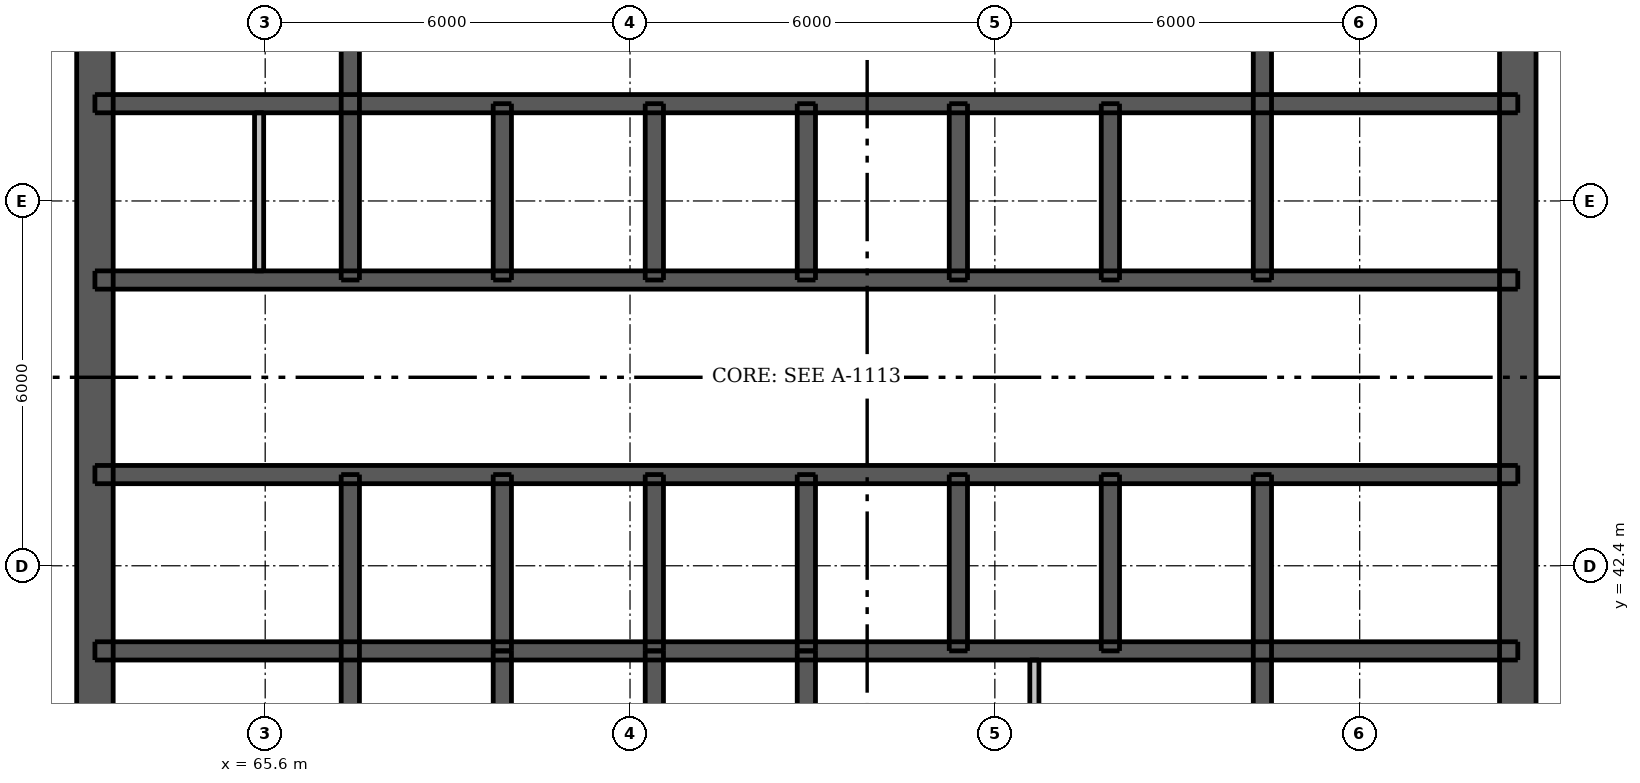
"""IFC4 building model, lengths in metres.
Left out: names, types, materials, properties, quantities, classifications, styles, units other than length and angle.
Written with IfcOpenShell. Run it as: python <this file> out.ifc"""

import sys

from ifc_helpers import new_model, si_unit, direction, frame, frame_2d, origin, place, context, subcontext, project, spatial, rectangle, extrude, element, fill, save


model = new_model("IFC4")
c1 = context("Model", 3, precision=1e-05, world=origin(), true_north=direction((0.0, 1.0)))
c2 = subcontext(c1, "Body", "Model", "MODEL_VIEW")
j1 = project(units=[si_unit("LENGTHUNIT", "METRE"), si_unit("PLANEANGLEUNIT", "RADIAN")], contexts=[c1])
p1 = place(None, origin())
s1 = spatial("IfcSite", under=j1, at=p1, CompositionType="ELEMENT")
p2 = place(p1, origin())
s2 = spatial("IfcBuilding", under=s1, at=p2, CompositionType="ELEMENT")
p3 = place(p2, frame((0.0, 0.0, 223.3)))
s3 = spatial("IfcBuildingStorey", under=s2, at=p3, CompositionType="ELEMENT", Elevation=223.3)
p4 = place(p3, frame((62.8, 33.5, 0.0), z_axis=(0.0, 0.0, 1.0), x_axis=(0.0, 1.0, 0.0)))
e1 = element("IfcWall", 1, at=p4, inside=s3, PredefinedType="SHEAR", context=c2, shape_type="SweptSolid", body=[
    extrude(rectangle(XDim=24.0, YDim=0.6, at=frame_2d((12.0, 0.0))), origin(), (0.0, 0.0, 1.0), 3.05),
])
p5 = place(p4, frame((11.2, 0.0, 0.0)))
e2 = element("IfcOpeningElement", 2, at=p5, cuts=e1, PredefinedType="OPENING", context=c2, shape_type="SweptSolid", body=[
    extrude(rectangle(XDim=1.6, YDim=2.1, at=frame_2d((0.8, 1.05))), frame((0.0, 0.31, 0.0), z_axis=(0.0, -1.0, 0.0), x_axis=(1.0, 0.0, 0.0)), (0.0, 0.0, 1.0), 0.62),
])
p6 = place(p3, frame((86.2, 33.5, 0.0), z_axis=(0.0, 0.0, 1.0), x_axis=(0.0, 1.0, 0.0)))
e3 = element("IfcWall", 3, at=p6, inside=s3, PredefinedType="SHEAR", context=c2, shape_type="SweptSolid", body=[
    extrude(rectangle(XDim=24.0, YDim=0.6, at=frame_2d((12.0, 0.0))), origin(), (0.0, 0.0, 1.0), 3.05),
])
p7 = place(p6, frame((11.2, 0.0, 0.0)))
e4 = element("IfcOpeningElement", 4, at=p7, cuts=e3, PredefinedType="OPENING", context=c2, shape_type="SweptSolid", body=[
    extrude(rectangle(XDim=1.6, YDim=2.1, at=frame_2d((0.8, 1.05))), frame((0.0, 0.31, 0.0), z_axis=(0.0, -1.0, 0.0), x_axis=(1.0, 0.0, 0.0)), (0.0, 0.0, 1.0), 0.62),
])
p8 = place(p3, frame((62.8, 41.0, 0.0), z_axis=(0.0, 0.0, 1.0), x_axis=(1.0, 0.0, 0.0)))
e5 = element("IfcWall", 5, at=p8, inside=s3, PredefinedType="SHEAR", context=c2, shape_type="SweptSolid", body=[
    extrude(rectangle(XDim=23.4, YDim=0.3, at=frame_2d((11.7, 0.0))), origin(), (0.0, 0.0, 1.0), 3.05),
])
p9 = place(p3, frame((62.8, 43.9, 0.0), z_axis=(0.0, 0.0, 1.0), x_axis=(1.0, 0.0, 0.0)))
e6 = element("IfcWall", 6, at=p9, inside=s3, PredefinedType="SHEAR", context=c2, shape_type="SweptSolid", body=[
    extrude(rectangle(XDim=23.4, YDim=0.3, at=frame_2d((11.7, 0.0))), origin(), (0.0, 0.0, 1.0), 3.05),
])
p10 = place(p9, frame((1.725, 0.0, 0.0)))
e7 = element("IfcOpeningElement", 7, at=p10, cuts=e6, PredefinedType="OPENING", context=c2, shape_type="SweptSolid", body=[
    extrude(rectangle(XDim=0.9, YDim=2.1, at=frame_2d((0.45, 1.05))), frame((0.0, 0.16, 0.0), z_axis=(0.0, -1.0, 0.0), x_axis=(1.0, 0.0, 0.0)), (0.0, 0.0, 1.0), 0.32),
])
p11 = place(p9, frame((20.775, 0.0, 0.0)))
e8 = element("IfcOpeningElement", 8, at=p11, cuts=e6, PredefinedType="OPENING", context=c2, shape_type="SweptSolid", body=[
    extrude(rectangle(XDim=0.9, YDim=2.1, at=frame_2d((0.45, 1.05))), frame((0.0, 0.16, 0.0), z_axis=(0.0, -1.0, 0.0), x_axis=(1.0, 0.0, 0.0)), (0.0, 0.0, 1.0), 0.32),
])
p12 = place(p9, frame((5.0, 0.0, 0.0)))
e9 = element("IfcOpeningElement", 9, at=p12, cuts=e6, PredefinedType="OPENING", context=c2, shape_type="SweptSolid", body=[
    extrude(rectangle(XDim=0.9, YDim=2.1, at=frame_2d((0.45, 1.05))), frame((0.0, 0.16, 0.0), z_axis=(0.0, -1.0, 0.0), x_axis=(1.0, 0.0, 0.0)), (0.0, 0.0, 1.0), 0.32),
])
p13 = place(p9, frame((7.5, 0.0, 0.0)))
e10 = element("IfcOpeningElement", 10, at=p13, cuts=e6, PredefinedType="OPENING", context=c2, shape_type="SweptSolid", body=[
    extrude(rectangle(XDim=0.9, YDim=2.1, at=frame_2d((0.45, 1.05))), frame((0.0, 0.16, 0.0), z_axis=(0.0, -1.0, 0.0), x_axis=(1.0, 0.0, 0.0)), (0.0, 0.0, 1.0), 0.32),
])
p14 = place(p9, frame((12.5, 0.0, 0.0)))
e11 = element("IfcOpeningElement", 11, at=p14, cuts=e6, PredefinedType="OPENING", context=c2, shape_type="SweptSolid", body=[
    extrude(rectangle(XDim=0.9, YDim=2.1, at=frame_2d((0.45, 1.05))), frame((0.0, 0.16, 0.0), z_axis=(0.0, -1.0, 0.0), x_axis=(1.0, 0.0, 0.0)), (0.0, 0.0, 1.0), 0.32),
])
p15 = place(p9, frame((15.0, 0.0, 0.0)))
e12 = element("IfcOpeningElement", 12, at=p15, cuts=e6, PredefinedType="OPENING", context=c2, shape_type="SweptSolid", body=[
    extrude(rectangle(XDim=0.9, YDim=2.1, at=frame_2d((0.45, 1.05))), frame((0.0, 0.16, 0.0), z_axis=(0.0, -1.0, 0.0), x_axis=(1.0, 0.0, 0.0)), (0.0, 0.0, 1.0), 0.32),
])
p16 = place(p3, frame((62.8, 47.1, 0.0), z_axis=(0.0, 0.0, 1.0), x_axis=(1.0, 0.0, 0.0)))
e13 = element("IfcWall", 13, at=p16, inside=s3, PredefinedType="SHEAR", context=c2, shape_type="SweptSolid", body=[
    extrude(rectangle(XDim=23.4, YDim=0.3, at=frame_2d((11.7, 0.0))), origin(), (0.0, 0.0, 1.0), 3.05),
])
p17 = place(p16, frame((1.05, 0.0, 0.0)))
e14 = element("IfcOpeningElement", 14, at=p17, cuts=e13, PredefinedType="OPENING", context=c2, shape_type="SweptSolid", body=[
    extrude(rectangle(XDim=0.9, YDim=2.1, at=frame_2d((0.45, 1.05))), frame((0.0, 0.16, 0.0), z_axis=(0.0, -1.0, 0.0), x_axis=(1.0, 0.0, 0.0)), (0.0, 0.0, 1.0), 0.32),
])
p18 = place(p16, frame((2.975, 0.0, 0.0)))
e15 = element("IfcOpeningElement", 15, at=p18, cuts=e13, PredefinedType="OPENING", context=c2, shape_type="SweptSolid", body=[
    extrude(rectangle(XDim=0.8, YDim=2.1, at=frame_2d((0.4, 1.05))), frame((0.0, 0.16, 0.0), z_axis=(0.0, -1.0, 0.0), x_axis=(1.0, 0.0, 0.0)), (0.0, 0.0, 1.0), 0.32),
])
p19 = place(p16, frame((20.775, 0.0, 0.0)))
e16 = element("IfcOpeningElement", 16, at=p19, cuts=e13, PredefinedType="OPENING", context=c2, shape_type="SweptSolid", body=[
    extrude(rectangle(XDim=0.9, YDim=2.1, at=frame_2d((0.45, 1.05))), frame((0.0, 0.16, 0.0), z_axis=(0.0, -1.0, 0.0), x_axis=(1.0, 0.0, 0.0)), (0.0, 0.0, 1.0), 0.32),
])
p20 = place(p16, frame((4.9, 0.0, 0.0)))
e17 = element("IfcOpeningElement", 17, at=p20, cuts=e13, PredefinedType="OPENING", context=c2, shape_type="SweptSolid", body=[
    extrude(rectangle(XDim=1.1, YDim=2.1, at=frame_2d((0.55, 1.05))), frame((0.0, 0.16, 0.0), z_axis=(0.0, -1.0, 0.0), x_axis=(1.0, 0.0, 0.0)), (0.0, 0.0, 1.0), 0.32),
])
p21 = place(p16, frame((7.4, 0.0, 0.0)))
e18 = element("IfcOpeningElement", 18, at=p21, cuts=e13, PredefinedType="OPENING", context=c2, shape_type="SweptSolid", body=[
    extrude(rectangle(XDim=1.1, YDim=2.1, at=frame_2d((0.55, 1.05))), frame((0.0, 0.16, 0.0), z_axis=(0.0, -1.0, 0.0), x_axis=(1.0, 0.0, 0.0)), (0.0, 0.0, 1.0), 0.32),
])
p22 = place(p16, frame((9.9, 0.0, 0.0)))
e19 = element("IfcOpeningElement", 19, at=p22, cuts=e13, PredefinedType="OPENING", context=c2, shape_type="SweptSolid", body=[
    extrude(rectangle(XDim=1.1, YDim=2.1, at=frame_2d((0.55, 1.05))), frame((0.0, 0.16, 0.0), z_axis=(0.0, -1.0, 0.0), x_axis=(1.0, 0.0, 0.0)), (0.0, 0.0, 1.0), 0.32),
])
p23 = place(p16, frame((12.4, 0.0, 0.0)))
e20 = element("IfcOpeningElement", 20, at=p23, cuts=e13, PredefinedType="OPENING", context=c2, shape_type="SweptSolid", body=[
    extrude(rectangle(XDim=1.1, YDim=2.1, at=frame_2d((0.55, 1.05))), frame((0.0, 0.16, 0.0), z_axis=(0.0, -1.0, 0.0), x_axis=(1.0, 0.0, 0.0)), (0.0, 0.0, 1.0), 0.32),
])
p24 = place(p16, frame((14.9, 0.0, 0.0)))
e21 = element("IfcOpeningElement", 21, at=p24, cuts=e13, PredefinedType="OPENING", context=c2, shape_type="SweptSolid", body=[
    extrude(rectangle(XDim=1.1, YDim=2.1, at=frame_2d((0.55, 1.05))), frame((0.0, 0.16, 0.0), z_axis=(0.0, -1.0, 0.0), x_axis=(1.0, 0.0, 0.0)), (0.0, 0.0, 1.0), 0.32),
])
p25 = place(p16, frame((17.4, 0.0, 0.0)))
e22 = element("IfcOpeningElement", 22, at=p25, cuts=e13, PredefinedType="OPENING", context=c2, shape_type="SweptSolid", body=[
    extrude(rectangle(XDim=1.1, YDim=2.1, at=frame_2d((0.55, 1.05))), frame((0.0, 0.16, 0.0), z_axis=(0.0, -1.0, 0.0), x_axis=(1.0, 0.0, 0.0)), (0.0, 0.0, 1.0), 0.32),
])
p26 = place(p3, frame((62.8, 50.0, 0.0), z_axis=(0.0, 0.0, 1.0), x_axis=(1.0, 0.0, 0.0)))
e23 = element("IfcWall", 23, at=p26, inside=s3, PredefinedType="SHEAR", context=c2, shape_type="SweptSolid", body=[
    extrude(rectangle(XDim=23.4, YDim=0.3, at=frame_2d((11.7, 0.0))), origin(), (0.0, 0.0, 1.0), 3.05),
])
p27 = place(p3, frame((67.0, 33.8, 0.0), z_axis=(0.0, 0.0, 1.0), x_axis=(0.0, 1.0, 0.0)))
e24 = element("IfcWall", 24, at=p27, inside=s3, PredefinedType="SHEAR", context=c2, shape_type="SweptSolid", body=[
    extrude(rectangle(XDim=10.1, YDim=0.3, at=frame_2d((5.05, 0.0))), origin(), (0.0, 0.0, 1.0), 3.05),
])
p28 = place(p27, frame((0.5, 0.0, 0.0)))
e25 = element("IfcOpeningElement", 25, at=p28, cuts=e24, PredefinedType="OPENING", context=c2, shape_type="SweptSolid", body=[
    extrude(rectangle(XDim=1.1, YDim=2.1, at=frame_2d((0.55, 1.05))), frame((0.0, 0.16, 0.0), z_axis=(0.0, -1.0, 0.0), x_axis=(1.0, 0.0, 0.0)), (0.0, 0.0, 1.0), 0.32),
])
for number, where, z_axis, x_axis in (
    (26, (67.0, 47.1, 0.0), (0.0, 0.0, 1.0), (0.0, 1.0, 0.0)),
    (27, (82.0, 33.8, 0.0), (0.0, 0.0, 1.0), (0.0, 1.0, 0.0)),
    (28, (82.0, 47.1, 0.0), (0.0, 0.0, 1.0), (0.0, 1.0, 0.0)),
):
    element("IfcWall", number, at=place(p3, frame(where, z_axis=z_axis, x_axis=x_axis)), inside=s3, PredefinedType="SHEAR", context=c2, shape_type="SweptSolid", body=[
        extrude(rectangle(XDim=10.1, YDim=0.3, at=frame_2d((5.05, 0.0))), origin(), (0.0, 0.0, 1.0), 3.05),
    ])
for number, where, z_axis, x_axis in (
    (29, (69.5, 41.0, 0.0), (0.0, 0.0, 1.0), (0.0, 1.0, 0.0)),
    (30, (69.5, 47.1, 0.0), (0.0, 0.0, 1.0), (0.0, 1.0, 0.0)),
    (31, (72.0, 41.0, 0.0), (0.0, 0.0, 1.0), (0.0, 1.0, 0.0)),
    (32, (72.0, 47.1, 0.0), (0.0, 0.0, 1.0), (0.0, 1.0, 0.0)),
    (33, (74.5, 41.0, 0.0), (0.0, 0.0, 1.0), (0.0, 1.0, 0.0)),
    (34, (74.5, 47.1, 0.0), (0.0, 0.0, 1.0), (0.0, 1.0, 0.0)),
    (35, (77.0, 41.0, 0.0), (0.0, 0.0, 1.0), (0.0, 1.0, 0.0)),
    (36, (77.0, 47.1, 0.0), (0.0, 0.0, 1.0), (0.0, 1.0, 0.0)),
    (37, (79.5, 41.0, 0.0), (0.0, 0.0, 1.0), (0.0, 1.0, 0.0)),
    (38, (79.5, 47.1, 0.0), (0.0, 0.0, 1.0), (0.0, 1.0, 0.0)),
    (39, (69.5, 38.1, 0.0), (0.0, 0.0, 1.0), (0.0, 1.0, 0.0)),
    (40, (72.0, 38.1, 0.0), (0.0, 0.0, 1.0), (0.0, 1.0, 0.0)),
    (41, (74.5, 38.1, 0.0), (0.0, 0.0, 1.0), (0.0, 1.0, 0.0)),
):
    element("IfcWall", number, at=place(p3, frame(where, z_axis=z_axis, x_axis=x_axis)), inside=s3, PredefinedType="SHEAR", context=c2, shape_type="SweptSolid", body=[
        extrude(rectangle(XDim=2.9, YDim=0.3, at=frame_2d((1.45, 0.0))), origin(), (0.0, 0.0, 1.0), 3.05),
    ])
p29 = place(p3, frame((78.25, 34.1, 0.0), z_axis=(0.0, 0.0, 1.0), x_axis=(0.0, 1.0, 0.0)))
e42 = element("IfcWall", 42, at=p29, inside=s3, PredefinedType="PLUMBINGWALL", context=c2, shape_type="SweptSolid", body=[
    extrude(rectangle(XDim=6.75, YDim=0.15, at=frame_2d((3.375, 0.0))), origin(), (0.0, 0.0, 1.0), 3.05),
])
p30 = place(p3, frame((65.5, 47.25, 0.0), z_axis=(0.0, 0.0, 1.0), x_axis=(0.0, 1.0, 0.0)))
e43 = element("IfcWall", 43, at=p30, inside=s3, PredefinedType="PLUMBINGWALL", context=c2, shape_type="SweptSolid", body=[
    extrude(rectangle(XDim=2.6, YDim=0.15, at=frame_2d((1.3, 0.0))), origin(), (0.0, 0.0, 1.0), 3.05),
])
p31 = place(p5, origin())
e44 = element("IfcDoor", 44, at=p31, inside=s3, OperationType="DOUBLE_DOOR_SINGLE_SWING", PredefinedType="DOOR", context=c2, shape_type="SweptSolid", body=[
    extrude(rectangle(XDim=1.6, YDim=2.1, at=frame_2d((0.8, 1.05))), frame((0.0, -0.237, 0.0), z_axis=(0.0, -1.0, 0.0), x_axis=(1.0, 0.0, 0.0)), (0.0, 0.0, 1.0), 0.05),
])
fill(e2, e44)
p32 = place(p7, origin())
e45 = element("IfcDoor", 45, at=p32, inside=s3, OperationType="DOUBLE_DOOR_SINGLE_SWING", PredefinedType="DOOR", context=c2, shape_type="SweptSolid", body=[
    extrude(rectangle(XDim=1.6, YDim=2.1, at=frame_2d((0.8, 1.05))), frame((0.0, 0.288, 0.0), z_axis=(0.0, -1.0, 0.0), x_axis=(1.0, 0.0, 0.0)), (0.0, 0.0, 1.0), 0.05),
])
fill(e4, e45)
p33 = place(p10, origin())
e46 = element("IfcDoor", 46, at=p33, inside=s3, OperationType="SINGLE_SWING_LEFT", PredefinedType="DOOR", context=c2, shape_type="SweptSolid", body=[
    extrude(rectangle(XDim=0.9, YDim=2.1, at=frame_2d((0.45, 1.05))), frame((0.0, -0.087, 0.0), z_axis=(0.0, -1.0, 0.0), x_axis=(1.0, 0.0, 0.0)), (0.0, 0.0, 1.0), 0.05),
])
fill(e7, e46)
p34 = place(p11, origin())
e47 = element("IfcDoor", 47, at=p34, inside=s3, OperationType="SINGLE_SWING_LEFT", PredefinedType="DOOR", context=c2, shape_type="SweptSolid", body=[
    extrude(rectangle(XDim=0.9, YDim=2.1, at=frame_2d((0.45, 1.05))), frame((0.0, -0.087, 0.0), z_axis=(0.0, -1.0, 0.0), x_axis=(1.0, 0.0, 0.0)), (0.0, 0.0, 1.0), 0.05),
])
fill(e8, e47)
p35 = place(p17, origin())
e48 = element("IfcDoor", 48, at=p35, inside=s3, OperationType="SINGLE_SWING_LEFT", PredefinedType="DOOR", context=c2, shape_type="SweptSolid", body=[
    extrude(rectangle(XDim=0.9, YDim=2.1, at=frame_2d((0.45, 1.05))), frame((0.0, 0.138, 0.0), z_axis=(0.0, -1.0, 0.0), x_axis=(1.0, 0.0, 0.0)), (0.0, 0.0, 1.0), 0.05),
])
fill(e14, e48)
p36 = place(p18, origin())
e49 = element("IfcDoor", 49, at=p36, inside=s3, OperationType="SINGLE_SWING_RIGHT", PredefinedType="DOOR", context=c2, shape_type="SweptSolid", body=[
    extrude(rectangle(XDim=0.8, YDim=2.1, at=frame_2d((0.4, 1.05))), frame((0.0, 0.138, 0.0), z_axis=(0.0, -1.0, 0.0), x_axis=(1.0, 0.0, 0.0)), (0.0, 0.0, 1.0), 0.05),
])
fill(e15, e49)
p37 = place(p19, origin())
e50 = element("IfcDoor", 50, at=p37, inside=s3, OperationType="SINGLE_SWING_LEFT", PredefinedType="DOOR", context=c2, shape_type="SweptSolid", body=[
    extrude(rectangle(XDim=0.9, YDim=2.1, at=frame_2d((0.45, 1.05))), frame((0.0, 0.138, 0.0), z_axis=(0.0, -1.0, 0.0), x_axis=(1.0, 0.0, 0.0)), (0.0, 0.0, 1.0), 0.05),
])
fill(e16, e50)
p38 = place(p12, origin())
e51 = element("IfcDoor", 51, at=p38, inside=s3, OperationType="SINGLE_SWING_RIGHT", PredefinedType="DOOR", context=c2, shape_type="SweptSolid", body=[
    extrude(rectangle(XDim=0.9, YDim=2.1, at=frame_2d((0.45, 1.05))), frame((0.0, -0.087, 0.0), z_axis=(0.0, -1.0, 0.0), x_axis=(1.0, 0.0, 0.0)), (0.0, 0.0, 1.0), 0.05),
])
fill(e9, e51)
p39 = place(p13, origin())
e52 = element("IfcDoor", 52, at=p39, inside=s3, OperationType="SINGLE_SWING_LEFT", PredefinedType="DOOR", context=c2, shape_type="SweptSolid", body=[
    extrude(rectangle(XDim=0.9, YDim=2.1, at=frame_2d((0.45, 1.05))), frame((0.0, -0.087, 0.0), z_axis=(0.0, -1.0, 0.0), x_axis=(1.0, 0.0, 0.0)), (0.0, 0.0, 1.0), 0.05),
])
fill(e10, e52)
p40 = place(p14, origin())
e53 = element("IfcDoor", 53, at=p40, inside=s3, OperationType="SINGLE_SWING_LEFT", PredefinedType="DOOR", context=c2, shape_type="SweptSolid", body=[
    extrude(rectangle(XDim=0.9, YDim=2.1, at=frame_2d((0.45, 1.05))), frame((0.0, -0.087, 0.0), z_axis=(0.0, -1.0, 0.0), x_axis=(1.0, 0.0, 0.0)), (0.0, 0.0, 1.0), 0.05),
])
fill(e11, e53)
p41 = place(p15, origin())
e54 = element("IfcDoor", 54, at=p41, inside=s3, OperationType="SINGLE_SWING_RIGHT", PredefinedType="DOOR", context=c2, shape_type="SweptSolid", body=[
    extrude(rectangle(XDim=0.9, YDim=2.1, at=frame_2d((0.45, 1.05))), frame((0.0, -0.087, 0.0), z_axis=(0.0, -1.0, 0.0), x_axis=(1.0, 0.0, 0.0)), (0.0, 0.0, 1.0), 0.05),
])
fill(e12, e54)
p42 = place(p20, origin())
e55 = element("IfcDoor", 55, at=p42, inside=s3, OperationType="DOUBLE_DOOR_SLIDING", PredefinedType="DOOR", context=c2, shape_type="SweptSolid", body=[
    extrude(rectangle(XDim=1.1, YDim=2.1, at=frame_2d((0.55, 1.05))), frame((0.0, 0.025, 0.0), z_axis=(0.0, -1.0, 0.0), x_axis=(1.0, 0.0, 0.0)), (0.0, 0.0, 1.0), 0.05),
])
fill(e17, e55)
p43 = place(p21, origin())
e56 = element("IfcDoor", 56, at=p43, inside=s3, OperationType="DOUBLE_DOOR_SLIDING", PredefinedType="DOOR", context=c2, shape_type="SweptSolid", body=[
    extrude(rectangle(XDim=1.1, YDim=2.1, at=frame_2d((0.55, 1.05))), frame((0.0, 0.025, 0.0), z_axis=(0.0, -1.0, 0.0), x_axis=(1.0, 0.0, 0.0)), (0.0, 0.0, 1.0), 0.05),
])
fill(e18, e56)
p44 = place(p22, origin())
e57 = element("IfcDoor", 57, at=p44, inside=s3, OperationType="DOUBLE_DOOR_SLIDING", PredefinedType="DOOR", context=c2, shape_type="SweptSolid", body=[
    extrude(rectangle(XDim=1.1, YDim=2.1, at=frame_2d((0.55, 1.05))), frame((0.0, 0.025, 0.0), z_axis=(0.0, -1.0, 0.0), x_axis=(1.0, 0.0, 0.0)), (0.0, 0.0, 1.0), 0.05),
])
fill(e19, e57)
p45 = place(p23, origin())
e58 = element("IfcDoor", 58, at=p45, inside=s3, OperationType="DOUBLE_DOOR_SLIDING", PredefinedType="DOOR", context=c2, shape_type="SweptSolid", body=[
    extrude(rectangle(XDim=1.1, YDim=2.1, at=frame_2d((0.55, 1.05))), frame((0.0, 0.025, 0.0), z_axis=(0.0, -1.0, 0.0), x_axis=(1.0, 0.0, 0.0)), (0.0, 0.0, 1.0), 0.05),
])
fill(e20, e58)
p46 = place(p24, origin())
e59 = element("IfcDoor", 59, at=p46, inside=s3, OperationType="DOUBLE_DOOR_SLIDING", PredefinedType="DOOR", context=c2, shape_type="SweptSolid", body=[
    extrude(rectangle(XDim=1.1, YDim=2.1, at=frame_2d((0.55, 1.05))), frame((0.0, 0.025, 0.0), z_axis=(0.0, -1.0, 0.0), x_axis=(1.0, 0.0, 0.0)), (0.0, 0.0, 1.0), 0.05),
])
fill(e21, e59)
p47 = place(p25, origin())
e60 = element("IfcDoor", 60, at=p47, inside=s3, OperationType="DOUBLE_DOOR_SLIDING", PredefinedType="DOOR", context=c2, shape_type="SweptSolid", body=[
    extrude(rectangle(XDim=1.1, YDim=2.1, at=frame_2d((0.55, 1.05))), frame((0.0, 0.025, 0.0), z_axis=(0.0, -1.0, 0.0), x_axis=(1.0, 0.0, 0.0)), (0.0, 0.0, 1.0), 0.05),
])
fill(e22, e60)
save(model, sys.argv[1])
